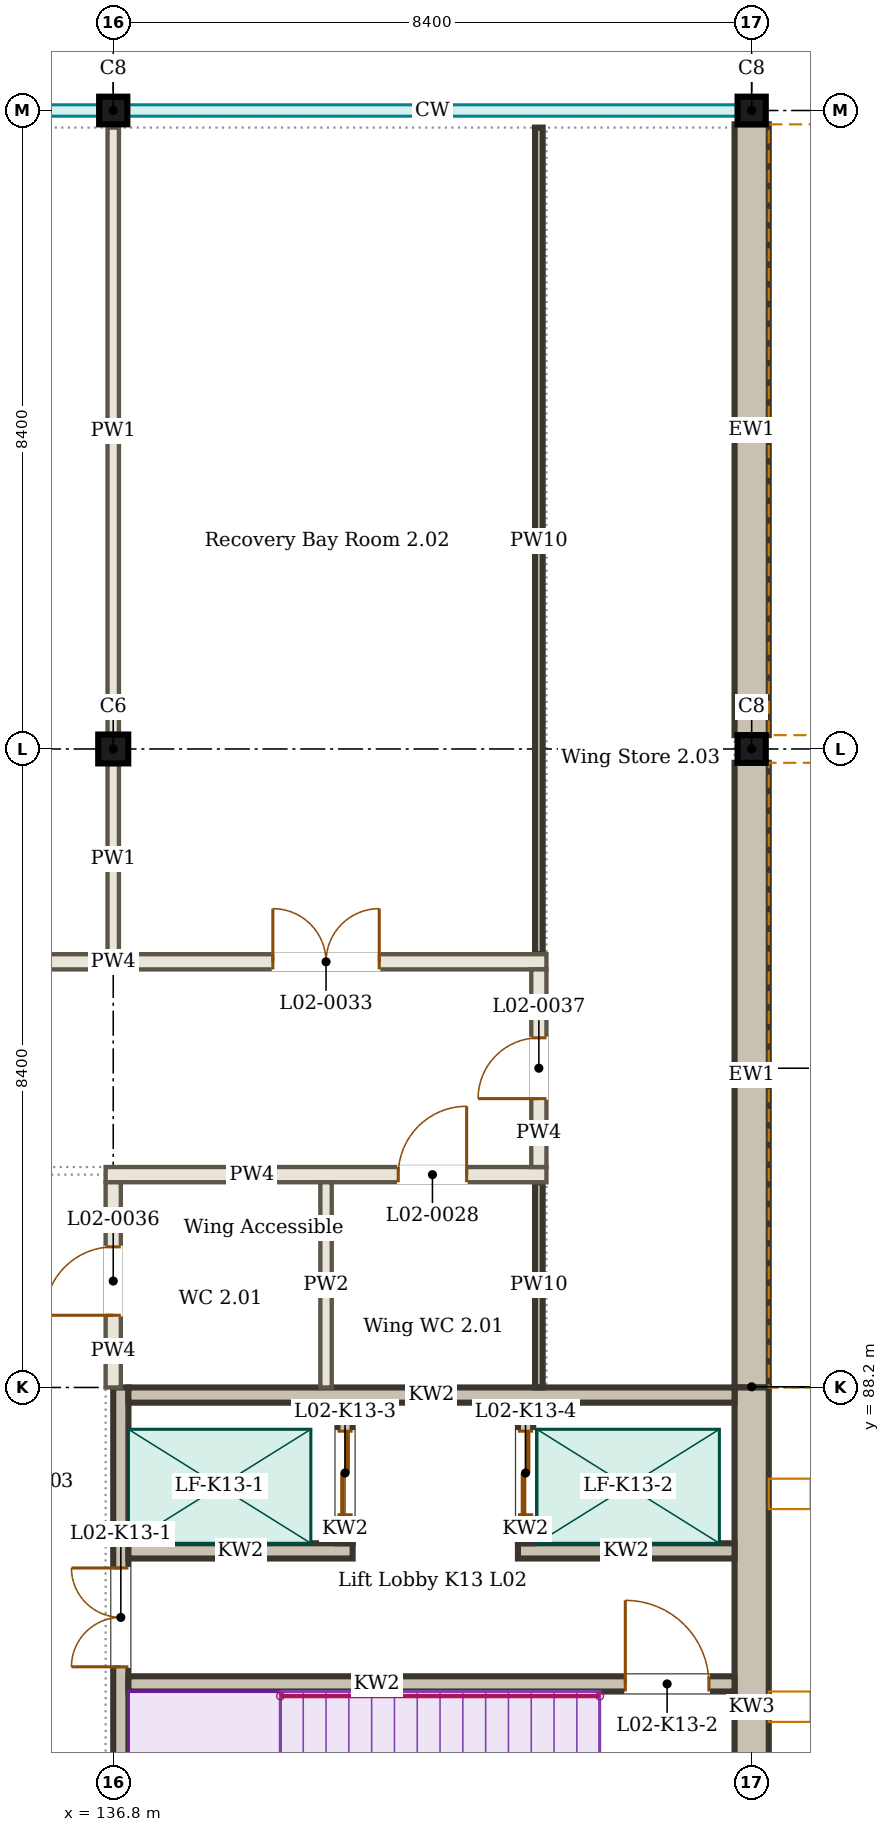
"""IFC4 building model, lengths in metres.
Left out: names, types, materials, properties, quantities, classifications, styles, units other than length and angle.
Written with IfcOpenShell. Run it as: python <this file> out.ifc"""

import sys

from ifc_helpers import new_model, si_unit, direction, frame, frame_2d, origin, origin_2d, place, context, subcontext, project, spatial, rectangle, i_section, extrude, element, fill, save


model = new_model("IFC4")
c1 = context("Model", 3, precision=1e-05, world=origin(), true_north=direction((0.0, 1.0)))
c2 = subcontext(c1, "Body", "Model", "MODEL_VIEW")
j1 = project(units=[si_unit("LENGTHUNIT", "METRE"), si_unit("PLANEANGLEUNIT", "RADIAN")], contexts=[c1])
p1 = place(None, origin())
s1 = spatial("IfcSite", under=j1, at=p1, CompositionType="ELEMENT")
p2 = place(p1, origin())
s2 = spatial("IfcBuilding", under=s1, at=p2, CompositionType="ELEMENT")
p3 = place(p2, frame((0.0, 0.0, 9.0)))
s3 = spatial("IfcBuildingStorey", under=s2, at=p3, CompositionType="ELEMENT", Elevation=9.0)
p4 = place(p3, frame((136.8, 96.6, 0.0), z_axis=(0.0, 0.0, 1.0), x_axis=(1.0, 0.0, 0.0)))
e1 = element("IfcColumn", 1, at=p4, inside=s3, PredefinedType="COLUMN", context=c2, shape_type="SweptSolid", body=[
    extrude(i_section(OverallWidth=0.395, OverallDepth=0.38, WebThickness=0.019, FlangeThickness=0.03, FilletRadius=0.027, at=origin_2d()), origin(), (0.0, 0.0, 1.0), 4.5),
])
for number, where, z_axis, x_axis in (
    (2, (145.2, 96.6, 0.0), (0.0, 0.0, 1.0), (1.0, 0.0, 0.0)),
    (3, (136.8, 105.0, 0.0), (0.0, 0.0, 1.0), (1.0, 0.0, 0.0)),
    (4, (145.2, 105.0, 0.0), (0.0, 0.0, 1.0), (1.0, 0.0, 0.0)),
):
    element("IfcColumn", number, at=place(p3, frame(where, z_axis=z_axis, x_axis=x_axis)), inside=s3, PredefinedType="COLUMN", context=c2, shape_type="SweptSolid", body=[
        extrude(i_section(OverallWidth=0.371, OverallDepth=0.364, WebThickness=0.013, FlangeThickness=0.022, FilletRadius=0.027, at=origin_2d()), origin(), (0.0, 0.0, 1.0), 4.5),
    ])
p5 = place(p3, frame((145.2, 88.2, 0.0), z_axis=(0.0, 0.0, 1.0), x_axis=(0.0, 1.0, 0.0)))
e5 = element("IfcWall", 5, at=p5, inside=s3, PredefinedType="SOLIDWALL", context=c2, shape_type="SweptSolid", body=[
    extrude(rectangle(XDim=8.218, YDim=0.45, at=frame_2d((4.109, 0.0))), origin(), (0.0, 0.0, 1.0), 3.85),
])
p6 = place(p3, frame((145.36, 88.2, 3.87), z_axis=(0.0, 0.0, 1.0), x_axis=(0.0, 1.0, 0.0)))
e6 = element("IfcWall", 6, at=p6, inside=s3, PredefinedType="SOLIDWALL", context=c2, shape_type="SweptSolid", body=[
    extrude(rectangle(XDim=8.4, YDim=0.13, at=frame_2d((4.2, 0.0))), origin(), (0.0, 0.0, 1.0), 0.63),
])
p7 = place(p3, frame((145.2, 96.782, 0.0), z_axis=(0.0, 0.0, 1.0), x_axis=(0.0, 1.0, 0.0)))
e7 = element("IfcWall", 7, at=p7, inside=s3, PredefinedType="SOLIDWALL", context=c2, shape_type="SweptSolid", body=[
    extrude(rectangle(XDim=8.036, YDim=0.45, at=frame_2d((4.018, 0.0))), origin(), (0.0, 0.0, 1.0), 3.85),
])
for number, where, z_axis, x_axis in (
    (8, (145.36, 96.6, 3.87), (0.0, 0.0, 1.0), (0.0, 1.0, 0.0)),
    (9, (136.8, 105.16, 3.87), (0.0, 0.0, 1.0), (1.0, 0.0, 0.0)),
):
    element("IfcWall", number, at=place(p3, frame(where, z_axis=z_axis, x_axis=x_axis)), inside=s3, PredefinedType="SOLIDWALL", context=c2, shape_type="SweptSolid", body=[
        extrude(rectangle(XDim=8.4, YDim=0.13, at=frame_2d((4.2, 0.0))), origin(), (0.0, 0.0, 1.0), 0.63),
    ])
p8 = place(p3, frame((136.7, 91.0, 0.0), z_axis=(0.0, 0.0, 1.0), x_axis=(1.0, 0.0, 0.0)))
e10 = element("IfcWall", 10, at=p8, inside=s3, PredefinedType="PARTITIONING", context=c2, shape_type="SweptSolid", body=[
    extrude(rectangle(XDim=5.8, YDim=0.2, at=frame_2d((2.9, 0.0))), origin(), (0.0, 0.0, 1.0), 3.8),
])
p9 = place(p8, frame((3.85, 0.0, 0.0)))
e11 = element("IfcOpeningElement", 11, at=p9, cuts=e10, PredefinedType="OPENING", context=c2, shape_type="SweptSolid", body=[
    extrude(rectangle(XDim=0.9, YDim=2.1, at=frame_2d((0.45, 1.05))), frame((0.0, 0.11, 0.0), z_axis=(0.0, -1.0, 0.0), x_axis=(1.0, 0.0, 0.0)), (0.0, 0.0, 1.0), 0.22),
])
p10 = place(p3, frame((119.9, 93.8, 0.0), z_axis=(0.0, 0.0, 1.0), x_axis=(1.0, 0.0, 0.0)))
e12 = element("IfcWall", 12, at=p10, inside=s3, PredefinedType="PARTITIONING", context=c2, shape_type="SweptSolid", body=[
    extrude(rectangle(XDim=22.6, YDim=0.2, at=frame_2d((11.3, 0.0))), origin(), (0.0, 0.0, 1.0), 3.8),
])
p11 = place(p10, frame((2.2, 0.0, 0.0)))
e13 = element("IfcOpeningElement", 13, at=p11, cuts=e12, PredefinedType="OPENING", context=c2, shape_type="SweptSolid", body=[
    extrude(rectangle(XDim=1.4, YDim=2.1, at=frame_2d((0.7, 1.05))), frame((0.0, 0.11, 0.0), z_axis=(0.0, -1.0, 0.0), x_axis=(1.0, 0.0, 0.0)), (0.0, 0.0, 1.0), 0.22),
])
p12 = place(p10, frame((6.4, 0.0, 0.0)))
e14 = element("IfcOpeningElement", 14, at=p12, cuts=e12, PredefinedType="OPENING", context=c2, shape_type="SweptSolid", body=[
    extrude(rectangle(XDim=1.4, YDim=2.1, at=frame_2d((0.7, 1.05))), frame((0.0, 0.11, 0.0), z_axis=(0.0, -1.0, 0.0), x_axis=(1.0, 0.0, 0.0)), (0.0, 0.0, 1.0), 0.22),
])
p13 = place(p10, frame((9.2, 0.0, 0.0)))
e15 = element("IfcOpeningElement", 15, at=p13, cuts=e12, PredefinedType="OPENING", context=c2, shape_type="SweptSolid", body=[
    extrude(rectangle(XDim=1.4, YDim=2.1, at=frame_2d((0.7, 1.05))), frame((0.0, 0.11, 0.0), z_axis=(0.0, -1.0, 0.0), x_axis=(1.0, 0.0, 0.0)), (0.0, 0.0, 1.0), 0.22),
])
p14 = place(p10, frame((13.4, 0.0, 0.0)))
e16 = element("IfcOpeningElement", 16, at=p14, cuts=e12, PredefinedType="OPENING", context=c2, shape_type="SweptSolid", body=[
    extrude(rectangle(XDim=1.4, YDim=2.1, at=frame_2d((0.7, 1.05))), frame((0.0, 0.11, 0.0), z_axis=(0.0, -1.0, 0.0), x_axis=(1.0, 0.0, 0.0)), (0.0, 0.0, 1.0), 0.22),
])
p15 = place(p10, frame((19.0, 0.0, 0.0)))
e17 = element("IfcOpeningElement", 17, at=p15, cuts=e12, PredefinedType="OPENING", context=c2, shape_type="SweptSolid", body=[
    extrude(rectangle(XDim=1.4, YDim=2.1, at=frame_2d((0.7, 1.05))), frame((0.0, 0.11, 0.0), z_axis=(0.0, -1.0, 0.0), x_axis=(1.0, 0.0, 0.0)), (0.0, 0.0, 1.0), 0.22),
])
p16 = place(p3, frame((136.8, 88.2, 0.0), z_axis=(0.0, 0.0, 1.0), x_axis=(0.0, 1.0, 0.0)))
e18 = element("IfcWall", 18, at=p16, inside=s3, PredefinedType="PARTITIONING", context=c2, shape_type="SweptSolid", body=[
    extrude(rectangle(XDim=2.7, YDim=0.2, at=frame_2d((1.35, 0.0))), origin(), (0.0, 0.0, 1.0), 3.8),
])
p17 = place(p16, frame((0.95, 0.0, 0.0)))
e19 = element("IfcOpeningElement", 19, at=p17, cuts=e18, PredefinedType="OPENING", context=c2, shape_type="SweptSolid", body=[
    extrude(rectangle(XDim=0.9, YDim=2.1, at=frame_2d((0.45, 1.05))), frame((0.0, 0.11, 0.0), z_axis=(0.0, -1.0, 0.0), x_axis=(1.0, 0.0, 0.0)), (0.0, 0.0, 1.0), 0.22),
])
p18 = place(p3, frame((136.8, 93.9, 0.0), z_axis=(0.0, 0.0, 1.0), x_axis=(0.0, 1.0, 0.0)))
e20 = element("IfcWall", 20, at=p18, inside=s3, PredefinedType="PARTITIONING", context=c2, shape_type="SweptSolid", body=[
    extrude(rectangle(XDim=2.503, YDim=0.15, at=frame_2d((1.251, 0.0))), origin(), (0.0, 0.0, 1.0), 3.8),
])
p19 = place(p3, frame((136.8, 96.798, 0.0), z_axis=(0.0, 0.0, 1.0), x_axis=(0.0, 1.0, 0.0)))
e21 = element("IfcWall", 21, at=p19, inside=s3, PredefinedType="PARTITIONING", context=c2, shape_type="SweptSolid", body=[
    extrude(rectangle(XDim=7.977, YDim=0.15, at=frame_2d((3.989, 0.0))), origin(), (0.0, 0.0, 1.0), 3.8),
])
p20 = place(p3, frame((139.6, 88.2, 0.0), z_axis=(0.0, 0.0, 1.0), x_axis=(0.0, 1.0, 0.0)))
e22 = element("IfcWall", 22, at=p20, inside=s3, PredefinedType="PARTITIONING", context=c2, shape_type="SweptSolid", body=[
    extrude(rectangle(XDim=2.7, YDim=0.15, at=frame_2d((1.35, 0.0))), origin(), (0.0, 0.0, 1.0), 3.95),
])
p21 = place(p3, frame((142.4, 88.2, 0.0), z_axis=(0.0, 0.0, 1.0), x_axis=(0.0, 1.0, 0.0)))
e23 = element("IfcWall", 23, at=p21, inside=s3, PredefinedType="SOLIDWALL", context=c2, shape_type="SweptSolid", body=[
    extrude(rectangle(XDim=2.7, YDim=0.1, at=frame_2d((1.35, 0.0))), origin(), (0.0, 0.0, 1.0), 3.95),
])
p22 = place(p3, frame((142.4, 91.1, 0.0), z_axis=(0.0, 0.0, 1.0), x_axis=(0.0, 1.0, 0.0)))
e24 = element("IfcWall", 24, at=p22, inside=s3, PredefinedType="PARTITIONING", context=c2, shape_type="SweptSolid", body=[
    extrude(rectangle(XDim=2.6, YDim=0.2, at=frame_2d((1.3, 0.0))), origin(), (0.0, 0.0, 1.0), 3.95),
])
p23 = place(p22, frame((0.9, 0.0, 0.0)))
e25 = element("IfcOpeningElement", 25, at=p23, cuts=e24, PredefinedType="OPENING", context=c2, shape_type="SweptSolid", body=[
    extrude(rectangle(XDim=0.8, YDim=2.1, at=frame_2d((0.4, 1.05))), frame((0.0, 0.11, 0.0), z_axis=(0.0, -1.0, 0.0), x_axis=(1.0, 0.0, 0.0)), (0.0, 0.0, 1.0), 0.22),
])
p24 = place(p3, frame((142.4, 93.9, 0.0), z_axis=(0.0, 0.0, 1.0), x_axis=(0.0, 1.0, 0.0)))
e26 = element("IfcWall", 26, at=p24, inside=s3, PredefinedType="SOLIDWALL", context=c2, shape_type="SweptSolid", body=[
    extrude(rectangle(XDim=10.875, YDim=0.1, at=frame_2d((5.438, 0.0))), origin(), (0.0, 0.0, 1.0), 3.8),
])
p25 = place(p3, frame((136.9, 79.8, 0.0), z_axis=(0.0, 0.0, 1.0), x_axis=(0.0, 1.0, 0.0)))
e27 = element("IfcWall", 27, at=p25, inside=s3, PredefinedType="SOLIDWALL", context=c2, shape_type="SweptSolid", body=[
    extrude(rectangle(XDim=8.4, YDim=0.2, at=frame_2d((4.2, 0.0))), origin(), (0.0, 0.0, 1.0), 4.5),
])
p26 = place(p25, frame((4.725, 0.0, 0.0)))
e28 = element("IfcOpeningElement", 28, at=p26, cuts=e27, PredefinedType="OPENING", context=c2, shape_type="SweptSolid", body=[
    extrude(rectangle(XDim=1.3, YDim=2.1, at=frame_2d((0.65, 1.05))), frame((0.0, 0.11, 0.0), z_axis=(0.0, -1.0, 0.0), x_axis=(1.0, 0.0, 0.0)), (0.0, 0.0, 1.0), 0.22),
])
p27 = place(p3, frame((145.2, 79.8, 0.0), z_axis=(0.0, 0.0, 1.0), x_axis=(0.0, 1.0, 0.0)))
e29 = element("IfcWall", 29, at=p27, inside=s3, PredefinedType="SOLIDWALL", context=c2, shape_type="SweptSolid", body=[
    extrude(rectangle(XDim=8.4, YDim=0.45, at=frame_2d((4.2, 0.0))), origin(), (0.0, 0.0, 1.0), 4.5),
])
p28 = place(p3, frame((137.0, 88.1, 0.0), z_axis=(0.0, 0.0, 1.0), x_axis=(1.0, 0.0, 0.0)))
e30 = element("IfcWall", 30, at=p28, inside=s3, PredefinedType="SOLIDWALL", context=c2, shape_type="SweptSolid", body=[
    extrude(rectangle(XDim=7.975, YDim=0.2, at=frame_2d((3.988, 0.0))), origin(), (0.0, 0.0, 1.0), 4.5),
])
p29 = place(p3, frame((137.0, 84.3, 0.0), z_axis=(0.0, 0.0, 1.0), x_axis=(1.0, 0.0, 0.0)))
e31 = element("IfcWall", 31, at=p29, inside=s3, PredefinedType="SOLIDWALL", context=c2, shape_type="SweptSolid", body=[
    extrude(rectangle(XDim=7.975, YDim=0.2, at=frame_2d((3.988, 0.0))), origin(), (0.0, 0.0, 1.0), 4.5),
])
p30 = place(p29, frame((6.538, 0.0, 0.0)))
e32 = element("IfcOpeningElement", 32, at=p30, cuts=e31, PredefinedType="OPENING", context=c2, shape_type="SweptSolid", body=[
    extrude(rectangle(XDim=1.1, YDim=2.1, at=frame_2d((0.55, 1.05))), frame((0.0, 0.11, 0.0), z_axis=(0.0, -1.0, 0.0), x_axis=(1.0, 0.0, 0.0)), (0.0, 0.0, 1.0), 0.22),
])
p31 = place(p3, frame((137.0, 86.05, 0.0), z_axis=(0.0, 0.0, 1.0), x_axis=(1.0, 0.0, 0.0)))
e33 = element("IfcWall", 33, at=p31, inside=s3, PredefinedType="SOLIDWALL", context=c2, shape_type="SweptSolid", body=[
    extrude(rectangle(XDim=2.95, YDim=0.2, at=frame_2d((1.475, 0.0))), origin(), (0.0, 0.0, 1.0), 4.5),
])
p32 = place(p3, frame((142.125, 86.05, 0.0), z_axis=(0.0, 0.0, 1.0), x_axis=(1.0, 0.0, 0.0)))
e34 = element("IfcWall", 34, at=p32, inside=s3, PredefinedType="SOLIDWALL", context=c2, shape_type="SweptSolid", body=[
    extrude(rectangle(XDim=2.85, YDim=0.2, at=frame_2d((1.425, 0.0))), origin(), (0.0, 0.0, 1.0), 4.5),
])
p33 = place(p3, frame((139.85, 86.15, 0.0), z_axis=(0.0, 0.0, 1.0), x_axis=(0.0, 1.0, 0.0)))
e35 = element("IfcWall", 35, at=p33, inside=s3, PredefinedType="SOLIDWALL", context=c2, shape_type="SweptSolid", body=[
    extrude(rectangle(XDim=1.85, YDim=0.2, at=frame_2d((0.925, 0.0))), origin(), (0.0, 0.0, 1.0), 4.5),
])
p34 = place(p33, frame((0.375, 0.0, 0.0)))
e36 = element("IfcOpeningElement", 36, at=p34, cuts=e35, PredefinedType="OPENING", context=c2, shape_type="SweptSolid", body=[
    extrude(rectangle(XDim=1.1, YDim=2.1, at=frame_2d((0.55, 1.05))), frame((0.0, 0.11, 0.0), z_axis=(0.0, -1.0, 0.0), x_axis=(1.0, 0.0, 0.0)), (0.0, 0.0, 1.0), 0.22),
])
p35 = place(p3, frame((142.225, 86.15, 0.0), z_axis=(0.0, 0.0, 1.0), x_axis=(0.0, 1.0, 0.0)))
e37 = element("IfcWall", 37, at=p35, inside=s3, PredefinedType="SOLIDWALL", context=c2, shape_type="SweptSolid", body=[
    extrude(rectangle(XDim=1.85, YDim=0.2, at=frame_2d((0.925, 0.0))), origin(), (0.0, 0.0, 1.0), 4.5),
])
p36 = place(p35, frame((0.375, 0.0, 0.0)))
e38 = element("IfcOpeningElement", 38, at=p36, cuts=e37, PredefinedType="OPENING", context=c2, shape_type="SweptSolid", body=[
    extrude(rectangle(XDim=1.1, YDim=2.1, at=frame_2d((0.55, 1.05))), frame((0.0, 0.11, 0.0), z_axis=(0.0, -1.0, 0.0), x_axis=(1.0, 0.0, 0.0)), (0.0, 0.0, 1.0), 0.22),
])
p37 = place(p9, origin())
e39 = element("IfcDoor", 39, at=p37, inside=s3, OperationType="SINGLE_SWING_RIGHT", PredefinedType="DOOR", context=c2, shape_type="SweptSolid", body=[
    extrude(rectangle(XDim=0.9, YDim=2.1, at=frame_2d((0.45, 1.05))), frame((0.0, 0.025, 0.0), z_axis=(0.0, -1.0, 0.0), x_axis=(1.0, 0.0, 0.0)), (0.0, 0.0, 1.0), 0.05),
])
fill(e11, e39)
p38 = place(p15, origin())
e40 = element("IfcDoor", 40, at=p38, inside=s3, OperationType="DOUBLE_DOOR_SINGLE_SWING", PredefinedType="DOOR", context=c2, shape_type="SweptSolid", body=[
    extrude(rectangle(XDim=1.4, YDim=2.1, at=frame_2d((0.7, 1.05))), frame((0.0, 0.025, 0.0), z_axis=(0.0, -1.0, 0.0), x_axis=(1.0, 0.0, 0.0)), (0.0, 0.0, 1.0), 0.05),
])
fill(e17, e40)
p39 = place(p17, origin())
e41 = element("IfcDoor", 41, at=p39, inside=s3, OperationType="SINGLE_SWING_LEFT", PredefinedType="DOOR", context=c2, shape_type="SweptSolid", body=[
    extrude(rectangle(XDim=0.9, YDim=2.1, at=frame_2d((0.45, 1.05))), frame((0.0, 0.025, 0.0), z_axis=(0.0, -1.0, 0.0), x_axis=(1.0, 0.0, 0.0)), (0.0, 0.0, 1.0), 0.05),
])
fill(e19, e41)
p40 = place(p23, origin())
e42 = element("IfcDoor", 42, at=p40, inside=s3, OperationType="SINGLE_SWING_LEFT", PredefinedType="DOOR", context=c2, shape_type="SweptSolid", body=[
    extrude(rectangle(XDim=0.8, YDim=2.1, at=frame_2d((0.4, 1.05))), frame((0.0, 0.025, 0.0), z_axis=(0.0, -1.0, 0.0), x_axis=(1.0, 0.0, 0.0)), (0.0, 0.0, 1.0), 0.05),
])
fill(e25, e42)
p41 = place(p26, origin())
e43 = element("IfcDoor", 43, at=p41, inside=s3, OperationType="DOUBLE_DOOR_DOUBLE_SWING", PredefinedType="DOOR", context=c2, shape_type="SweptSolid", body=[
    extrude(rectangle(XDim=1.3, YDim=2.1, at=frame_2d((0.65, 1.05))), frame((0.0, 0.025, 0.0), z_axis=(0.0, -1.0, 0.0), x_axis=(1.0, 0.0, 0.0)), (0.0, 0.0, 1.0), 0.05),
])
fill(e28, e43)
p42 = place(p30, origin())
e44 = element("IfcDoor", 44, at=p42, inside=s3, OperationType="SINGLE_SWING_LEFT", PredefinedType="DOOR", context=c2, shape_type="SweptSolid", body=[
    extrude(rectangle(XDim=1.1, YDim=2.1, at=frame_2d((0.55, 1.05))), frame((0.0, 0.025, 0.0), z_axis=(0.0, -1.0, 0.0), x_axis=(1.0, 0.0, 0.0)), (0.0, 0.0, 1.0), 0.05),
])
fill(e32, e44)
p43 = place(p34, origin())
e45 = element("IfcDoor", 45, at=p43, inside=s3, OperationType="DOUBLE_DOOR_SLIDING", PredefinedType="DOOR", context=c2, shape_type="SweptSolid", body=[
    extrude(rectangle(XDim=1.1, YDim=2.1, at=frame_2d((0.55, 1.05))), frame((0.0, 0.025, 0.0), z_axis=(0.0, -1.0, 0.0), x_axis=(1.0, 0.0, 0.0)), (0.0, 0.0, 1.0), 0.05),
])
fill(e36, e45)
p44 = place(p36, origin())
e46 = element("IfcDoor", 46, at=p44, inside=s3, OperationType="DOUBLE_DOOR_SLIDING", PredefinedType="DOOR", context=c2, shape_type="SweptSolid", body=[
    extrude(rectangle(XDim=1.1, YDim=2.1, at=frame_2d((0.55, 1.05))), frame((0.0, 0.025, 0.0), z_axis=(0.0, -1.0, 0.0), x_axis=(1.0, 0.0, 0.0)), (0.0, 0.0, 1.0), 0.05),
])
fill(e38, e46)
save(model, sys.argv[1])
